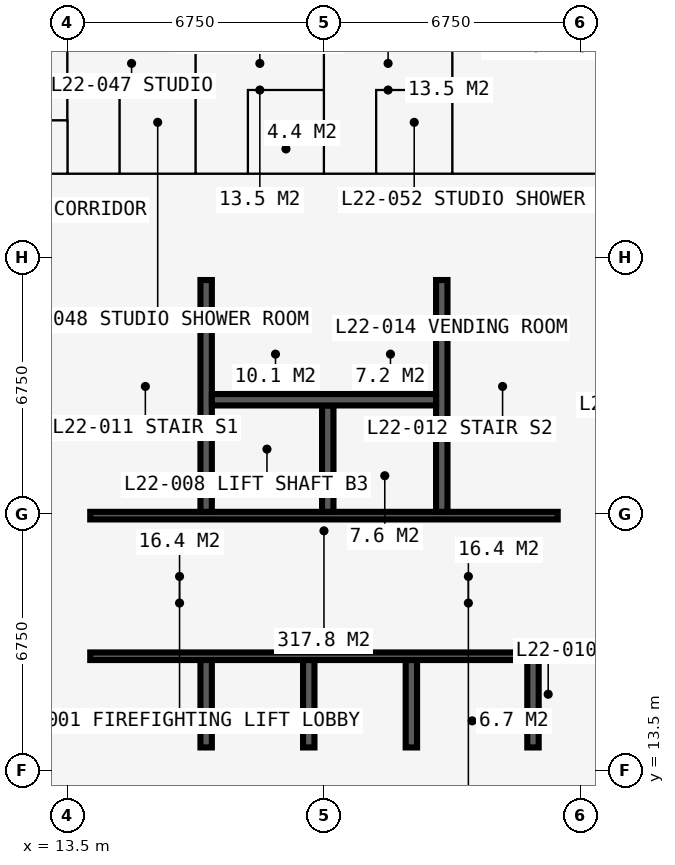
"""IFC4 building model, lengths in metres.
Left out: names, types, materials, properties, quantities, classifications, styles, units other than length and angle.
Written with IfcOpenShell. Run it as: python <this file> out.ifc"""

import sys

from ifc_helpers import new_model, si_unit, direction, frame, frame_2d, origin, place, context, subcontext, project, spatial, rectangle, extrude, element, fill, save


model = new_model("IFC4")
c1 = context("Model", 3, precision=1e-05, world=origin(), true_north=direction((0.0, 1.0)))
c2 = subcontext(c1, "Body", "Model", "MODEL_VIEW")
j1 = project(units=[si_unit("LENGTHUNIT", "METRE"), si_unit("PLANEANGLEUNIT", "RADIAN")], contexts=[c1])
p1 = place(None, origin())
s1 = spatial("IfcSite", under=j1, at=p1, CompositionType="ELEMENT")
p2 = place(p1, origin())
s2 = spatial("IfcBuilding", under=s1, at=p2, CompositionType="ELEMENT")
p3 = place(p2, frame((0.0, 0.0, 83.7)))
s3 = spatial("IfcBuildingStorey", under=s2, at=p3, CompositionType="ELEMENT", Elevation=83.7)
p4 = place(p3, frame((12.9, 13.5, 0.0), z_axis=(0.0, 0.0, 1.0), x_axis=(1.0, 0.0, 0.0)))
e1 = element("IfcWall", 1, at=p4, inside=s3, PredefinedType="SHEAR", context=c2, shape_type="SweptSolid", body=[
    extrude(rectangle(XDim=14.7, YDim=1.2, at=frame_2d((7.35, 0.0))), origin(), (0.0, 0.0, 1.0), 3.6),
])
p5 = place(p3, frame((27.0, 14.1, 0.0), z_axis=(0.0, 0.0, 1.0), x_axis=(0.0, 1.0, 0.0)))
e2 = element("IfcWall", 2, at=p5, inside=s3, PredefinedType="SHEAR", context=c2, shape_type="SweptSolid", body=[
    extrude(rectangle(XDim=12.3, YDim=1.2, at=frame_2d((6.15, 0.0))), origin(), (0.0, 0.0, 1.0), 3.6),
])
p6 = place(p5, frame((3.65, 0.0, 0.0)))
e3 = element("IfcOpeningElement", 3, at=p6, cuts=e2, PredefinedType="OPENING", context=c2, shape_type="SweptSolid", body=[
    extrude(rectangle(XDim=1.2, YDim=2.2, at=frame_2d((0.6, 1.1))), frame((0.0, 0.61, 0.0), z_axis=(0.0, -1.0, 0.0), x_axis=(1.0, 0.0, 0.0)), (0.0, 0.0, 1.0), 1.22),
])
p7 = place(p3, frame((27.6, 27.0, 0.0), z_axis=(0.0, 0.0, 1.0), x_axis=(-1.0, 0.0, 0.0)))
e4 = element("IfcWall", 4, at=p7, inside=s3, PredefinedType="SHEAR", context=c2, shape_type="SweptSolid", body=[
    extrude(rectangle(XDim=14.7, YDim=1.2, at=frame_2d((7.35, 0.0))), origin(), (0.0, 0.0, 1.0), 3.6),
])
p8 = place(p7, frame((4.55, 0.0, 0.0)))
e5 = element("IfcOpeningElement", 5, at=p8, cuts=e4, PredefinedType="OPENING", context=c2, shape_type="SweptSolid", body=[
    extrude(rectangle(XDim=0.9, YDim=2.2, at=frame_2d((0.45, 1.1))), frame((0.0, 0.61, 0.0), z_axis=(0.0, -1.0, 0.0), x_axis=(1.0, 0.0, 0.0)), (0.0, 0.0, 1.0), 1.22),
])
p9 = place(p7, frame((7.525, 0.0, 0.0)))
e6 = element("IfcOpeningElement", 6, at=p9, cuts=e4, PredefinedType="OPENING", context=c2, shape_type="SweptSolid", body=[
    extrude(rectangle(XDim=1.0, YDim=2.2, at=frame_2d((0.5, 1.1))), frame((0.0, 0.61, 0.0), z_axis=(0.0, -1.0, 0.0), x_axis=(1.0, 0.0, 0.0)), (0.0, 0.0, 1.0), 1.22),
])
p10 = place(p3, frame((13.5, 26.4, 0.0), z_axis=(0.0, 0.0, 1.0), x_axis=(0.0, -1.0, 0.0)))
e7 = element("IfcWall", 7, at=p10, inside=s3, PredefinedType="SHEAR", context=c2, shape_type="SweptSolid", body=[
    extrude(rectangle(XDim=12.3, YDim=1.2, at=frame_2d((6.15, 0.0))), origin(), (0.0, 0.0, 1.0), 3.6),
])
p11 = place(p10, frame((7.45, 0.0, 0.0)))
e8 = element("IfcOpeningElement", 8, at=p11, cuts=e7, PredefinedType="OPENING", context=c2, shape_type="SweptSolid", body=[
    extrude(rectangle(XDim=1.2, YDim=2.2, at=frame_2d((0.6, 1.1))), frame((0.0, 0.61, 0.0), z_axis=(0.0, -1.0, 0.0), x_axis=(1.0, 0.0, 0.0)), (0.0, 0.0, 1.0), 1.22),
])
p12 = place(p3, frame((14.1, 16.5, 0.0), z_axis=(0.0, 0.0, 1.0), x_axis=(1.0, 0.0, 0.0)))
e9 = element("IfcWall", 9, at=p12, inside=s3, PredefinedType="SHEAR", context=c2, shape_type="SweptSolid", body=[
    extrude(rectangle(XDim=12.3, YDim=0.2, at=frame_2d((6.15, 0.0))), origin(), (0.0, 0.0, 1.0), 3.6),
])
p13 = place(p12, frame((0.9, 0.0, 0.0)))
e10 = element("IfcOpeningElement", 10, at=p13, cuts=e9, PredefinedType="OPENING", context=c2, shape_type="SweptSolid", body=[
    extrude(rectangle(XDim=1.1, YDim=2.2, at=frame_2d((0.55, 1.1))), frame((0.0, 0.11, 0.0), z_axis=(0.0, -1.0, 0.0), x_axis=(1.0, 0.0, 0.0)), (0.0, 0.0, 1.0), 0.22),
])
p14 = place(p12, frame((9.5, 0.0, 0.0)))
e11 = element("IfcOpeningElement", 11, at=p14, cuts=e9, PredefinedType="OPENING", context=c2, shape_type="SweptSolid", body=[
    extrude(rectangle(XDim=1.1, YDim=2.2, at=frame_2d((0.55, 1.1))), frame((0.0, 0.11, 0.0), z_axis=(0.0, -1.0, 0.0), x_axis=(1.0, 0.0, 0.0)), (0.0, 0.0, 1.0), 0.22),
])
p15 = place(p3, frame((14.1, 20.2, 0.0), z_axis=(0.0, 0.0, 1.0), x_axis=(1.0, 0.0, 0.0)))
e12 = element("IfcWall", 12, at=p15, inside=s3, PredefinedType="SHEAR", context=c2, shape_type="SweptSolid", body=[
    extrude(rectangle(XDim=12.3, YDim=0.2, at=frame_2d((6.15, 0.0))), origin(), (0.0, 0.0, 1.0), 3.6),
])
p16 = place(p15, frame((0.35, 0.0, 0.0)))
e13 = element("IfcOpeningElement", 13, at=p16, cuts=e12, PredefinedType="OPENING", context=c2, shape_type="SweptSolid", body=[
    extrude(rectangle(XDim=1.1, YDim=2.2, at=frame_2d((0.55, 1.1))), frame((0.0, 0.11, 0.0), z_axis=(0.0, -1.0, 0.0), x_axis=(1.0, 0.0, 0.0)), (0.0, 0.0, 1.0), 0.22),
])
p17 = place(p15, frame((9.75, 0.0, 0.0)))
e14 = element("IfcOpeningElement", 14, at=p17, cuts=e12, PredefinedType="OPENING", context=c2, shape_type="SweptSolid", body=[
    extrude(rectangle(XDim=1.1, YDim=2.2, at=frame_2d((0.55, 1.1))), frame((0.0, 0.11, 0.0), z_axis=(0.0, -1.0, 0.0), x_axis=(1.0, 0.0, 0.0)), (0.0, 0.0, 1.0), 0.22),
])
for number, where, z_axis, x_axis in (
    (15, (17.15, 20.3, 0.0), (0.0, 0.0, 1.0), (0.0, 1.0, 0.0)),
    (16, (23.35, 20.3, 0.0), (0.0, 0.0, 1.0), (0.0, 1.0, 0.0)),
):
    element("IfcWall", number, at=place(p3, frame(where, z_axis=z_axis, x_axis=x_axis)), inside=s3, PredefinedType="SHEAR", context=c2, shape_type="SweptSolid", body=[
        extrude(rectangle(XDim=6.1, YDim=0.3, at=frame_2d((3.05, 0.0))), origin(), (0.0, 0.0, 1.0), 3.6),
    ])
p18 = place(p3, frame((20.35, 20.3, 0.0), z_axis=(0.0, 0.0, 1.0), x_axis=(0.0, 1.0, 0.0)))
e17 = element("IfcWall", 17, at=p18, inside=s3, PredefinedType="SHEAR", context=c2, shape_type="SweptSolid", body=[
    extrude(rectangle(XDim=2.8, YDim=0.3, at=frame_2d((1.4, 0.0))), origin(), (0.0, 0.0, 1.0), 3.6),
])
p19 = place(p3, frame((17.3, 23.25, 0.0), z_axis=(0.0, 0.0, 1.0), x_axis=(1.0, 0.0, 0.0)))
e18 = element("IfcWall", 18, at=p19, inside=s3, PredefinedType="SHEAR", context=c2, shape_type="SweptSolid", body=[
    extrude(rectangle(XDim=5.9, YDim=0.3, at=frame_2d((2.95, 0.0))), origin(), (0.0, 0.0, 1.0), 3.6),
])
for number, where, z_axis, x_axis in (
    (19, (17.15, 14.1, 0.0), (0.0, 0.0, 1.0), (0.0, 1.0, 0.0)),
    (20, (19.85, 14.1, 0.0), (0.0, 0.0, 1.0), (0.0, 1.0, 0.0)),
    (21, (22.55, 14.1, 0.0), (0.0, 0.0, 1.0), (0.0, 1.0, 0.0)),
    (22, (25.75, 14.1, 0.0), (0.0, 0.0, 1.0), (0.0, 1.0, 0.0)),
):
    element("IfcWall", number, at=place(p3, frame(where, z_axis=z_axis, x_axis=x_axis)), inside=s3, PredefinedType="SHEAR", context=c2, shape_type="SweptSolid", body=[
        extrude(rectangle(XDim=2.3, YDim=0.3, at=frame_2d((1.15, 0.0))), origin(), (0.0, 0.0, 1.0), 3.6),
    ])
p20 = place(p3, frame((18.875, 16.6, 0.0), z_axis=(0.0, 0.0, 1.0), x_axis=(0.0, 1.0, 0.0)))
e23 = element("IfcWall", 23, at=p20, inside=s3, PredefinedType="PARTITIONING", context=c2, shape_type="SweptSolid", body=[
    extrude(rectangle(XDim=3.5, YDim=0.15, at=frame_2d((1.75, 0.0))), origin(), (0.0, 0.0, 1.0), 3.375),
])
p21 = place(p20, frame((1.15, 0.0, 0.0)))
e24 = element("IfcOpeningElement", 24, at=p21, cuts=e23, PredefinedType="OPENING", context=c2, shape_type="SweptSolid", body=[
    extrude(rectangle(XDim=1.2, YDim=2.2, at=frame_2d((0.6, 1.1))), frame((0.0, 0.085, 0.0), z_axis=(0.0, -1.0, 0.0), x_axis=(1.0, 0.0, 0.0)), (0.0, 0.0, 1.0), 0.17),
])
p22 = place(p3, frame((21.625, 16.6, 0.0), z_axis=(0.0, 0.0, 1.0), x_axis=(0.0, 1.0, 0.0)))
e25 = element("IfcWall", 25, at=p22, inside=s3, PredefinedType="PARTITIONING", context=c2, shape_type="SweptSolid", body=[
    extrude(rectangle(XDim=3.5, YDim=0.15, at=frame_2d((1.75, 0.0))), origin(), (0.0, 0.0, 1.0), 3.375),
])
p23 = place(p22, frame((1.15, 0.0, 0.0)))
e26 = element("IfcOpeningElement", 26, at=p23, cuts=e25, PredefinedType="OPENING", context=c2, shape_type="SweptSolid", body=[
    extrude(rectangle(XDim=1.2, YDim=2.2, at=frame_2d((0.6, 1.1))), frame((0.0, 0.085, 0.0), z_axis=(0.0, -1.0, 0.0), x_axis=(1.0, 0.0, 0.0)), (0.0, 0.0, 1.0), 0.17),
])
p24 = place(p3, frame((20.725, 23.4, 0.0), z_axis=(0.0, 0.0, 1.0), x_axis=(0.0, 1.0, 0.0)))
e27 = element("IfcWall", 27, at=p24, inside=s3, PredefinedType="PARTITIONING", context=c2, shape_type="SweptSolid", body=[
    extrude(rectangle(XDim=3.0, YDim=0.15, at=frame_2d((1.5, 0.0))), origin(), (0.0, 0.0, 1.0), 3.375),
])
p25 = place(p3, frame((10.125, 30.6, 0.0), z_axis=(0.0, 0.0, 1.0), x_axis=(1.0, 0.0, 0.0)))
e28 = element("IfcWall", 28, at=p25, inside=s3, PredefinedType="PARTITIONING", context=c2, shape_type="SweptSolid", body=[
    extrude(rectangle(XDim=3.375, YDim=0.1, at=frame_2d((1.688, 0.0))), origin(), (0.0, 0.0, 1.0), 3.375),
])
p26 = place(p25, frame((2.2, 0.0, 0.0)))
e29 = element("IfcOpeningElement", 29, at=p26, cuts=e28, PredefinedType="OPENING", context=c2, shape_type="SweptSolid", body=[
    extrude(rectangle(XDim=0.95, YDim=2.2, at=frame_2d((0.475, 1.1))), frame((0.0, 0.06, 0.0), z_axis=(0.0, -1.0, 0.0), x_axis=(1.0, 0.0, 0.0)), (0.0, 0.0, 1.0), 0.12),
])
p27 = place(p3, frame((11.3, 29.2, 0.0), z_axis=(0.0, 0.0, 1.0), x_axis=(1.0, 0.0, 0.0)))
e30 = element("IfcWall", 30, at=p27, inside=s3, PredefinedType="PARTITIONING", context=c2, shape_type="SweptSolid", body=[
    extrude(rectangle(XDim=19.075, YDim=0.15, at=frame_2d((9.538, 0.0))), origin(), (0.0, 0.0, 1.0), 3.375),
])
p28 = place(p27, frame((5.825, 0.0, 0.0)))
e31 = element("IfcOpeningElement", 31, at=p28, cuts=e30, PredefinedType="OPENING", context=c2, shape_type="SweptSolid", body=[
    extrude(rectangle(XDim=0.95, YDim=2.2, at=frame_2d((0.475, 1.1))), frame((0.0, 0.085, 0.0), z_axis=(0.0, -1.0, 0.0), x_axis=(1.0, 0.0, 0.0)), (0.0, 0.0, 1.0), 0.17),
])
p29 = place(p27, frame((9.2, 0.0, 0.0)))
e32 = element("IfcOpeningElement", 32, at=p29, cuts=e30, PredefinedType="OPENING", context=c2, shape_type="SweptSolid", body=[
    extrude(rectangle(XDim=0.95, YDim=2.2, at=frame_2d((0.475, 1.1))), frame((0.0, 0.085, 0.0), z_axis=(0.0, -1.0, 0.0), x_axis=(1.0, 0.0, 0.0)), (0.0, 0.0, 1.0), 0.17),
])
p30 = place(p27, frame((0.6, 0.0, 0.0)))
e33 = element("IfcOpeningElement", 33, at=p30, cuts=e30, PredefinedType="OPENING", context=c2, shape_type="SweptSolid", body=[
    extrude(rectangle(XDim=1.0, YDim=2.2, at=frame_2d((0.5, 1.1))), frame((0.0, 0.085, 0.0), z_axis=(0.0, -1.0, 0.0), x_axis=(1.0, 0.0, 0.0)), (0.0, 0.0, 1.0), 0.17),
])
p31 = place(p3, frame((13.5, 29.2, 0.0), z_axis=(0.0, 0.0, 1.0), x_axis=(0.0, 1.0, 0.0)))
e34 = element("IfcWall", 34, at=p31, inside=s3, PredefinedType="PARTITIONING", context=c2, shape_type="SweptSolid", body=[
    extrude(rectangle(XDim=5.284, YDim=0.175, at=frame_2d((2.642, 0.0))), origin(), (0.0, 0.0, 1.0), 2.61),
])
p32 = place(p31, frame((0.25, 0.0, 0.0)))
e35 = element("IfcOpeningElement", 35, at=p32, cuts=e34, PredefinedType="OPENING", context=c2, shape_type="SweptSolid", body=[
    extrude(rectangle(XDim=0.95, YDim=2.2, at=frame_2d((0.475, 1.1))), frame((0.0, 0.097, 0.0), z_axis=(0.0, -1.0, 0.0), x_axis=(1.0, 0.0, 0.0)), (0.0, 0.0, 1.0), 0.195),
])
p33 = place(p3, frame((14.875, 29.2, 0.0), z_axis=(0.0, 0.0, 1.0), x_axis=(0.0, 1.0, 0.0)))
e36 = element("IfcWall", 36, at=p33, inside=s3, PredefinedType="PARTITIONING", context=c2, shape_type="SweptSolid", body=[
    extrude(rectangle(XDim=2.2, YDim=0.1, at=frame_2d((1.1, 0.0))), origin(), (0.0, 0.0, 1.0), 3.375),
])
p34 = place(p33, frame((0.65, 0.0, 0.0)))
e37 = element("IfcOpeningElement", 37, at=p34, cuts=e36, PredefinedType="OPENING", context=c2, shape_type="SweptSolid", body=[
    extrude(rectangle(XDim=0.9, YDim=2.2, at=frame_2d((0.45, 1.1))), frame((0.0, 0.06, 0.0), z_axis=(0.0, -1.0, 0.0), x_axis=(1.0, 0.0, 0.0)), (0.0, 0.0, 1.0), 0.12),
])
p35 = place(p3, frame((14.875, 31.4, 0.0), z_axis=(0.0, 0.0, 1.0), x_axis=(1.0, 0.0, 0.0)))
e38 = element("IfcWall", 38, at=p35, inside=s3, PredefinedType="PARTITIONING", context=c2, shape_type="SweptSolid", body=[
    extrude(rectangle(XDim=2.0, YDim=0.1, at=frame_2d((1.0, 0.0))), origin(), (0.0, 0.0, 1.0), 3.375),
])
p36 = place(p3, frame((16.875, 29.2, 0.0), z_axis=(0.0, 0.0, 1.0), x_axis=(0.0, 1.0, 0.0)))
e39 = element("IfcWall", 39, at=p36, inside=s3, PredefinedType="PARTITIONING", context=c2, shape_type="SweptSolid", body=[
    extrude(rectangle(XDim=5.284, YDim=0.175, at=frame_2d((2.642, 0.0))), origin(), (0.0, 0.0, 1.0), 3.375),
])
p37 = place(p3, frame((18.25, 29.2, 0.0), z_axis=(0.0, 0.0, 1.0), x_axis=(0.0, 1.0, 0.0)))
e40 = element("IfcWall", 40, at=p37, inside=s3, PredefinedType="PARTITIONING", context=c2, shape_type="SweptSolid", body=[
    extrude(rectangle(XDim=2.2, YDim=0.1, at=frame_2d((1.1, 0.0))), origin(), (0.0, 0.0, 1.0), 3.375),
])
p38 = place(p37, frame((0.65, 0.0, 0.0)))
e41 = element("IfcOpeningElement", 41, at=p38, cuts=e40, PredefinedType="OPENING", context=c2, shape_type="SweptSolid", body=[
    extrude(rectangle(XDim=0.9, YDim=2.2, at=frame_2d((0.45, 1.1))), frame((0.0, 0.06, 0.0), z_axis=(0.0, -1.0, 0.0), x_axis=(1.0, 0.0, 0.0)), (0.0, 0.0, 1.0), 0.12),
])
p39 = place(p3, frame((18.25, 31.4, 0.0), z_axis=(0.0, 0.0, 1.0), x_axis=(1.0, 0.0, 0.0)))
e42 = element("IfcWall", 42, at=p39, inside=s3, PredefinedType="PARTITIONING", context=c2, shape_type="SweptSolid", body=[
    extrude(rectangle(XDim=2.0, YDim=0.1, at=frame_2d((1.0, 0.0))), origin(), (0.0, 0.0, 1.0), 3.375),
])
p40 = place(p3, frame((20.25, 29.2, 0.0), z_axis=(0.0, 0.0, 1.0), x_axis=(0.0, 1.0, 0.0)))
e43 = element("IfcWall", 43, at=p40, inside=s3, PredefinedType="PARTITIONING", context=c2, shape_type="SweptSolid", body=[
    extrude(rectangle(XDim=5.284, YDim=0.175, at=frame_2d((2.642, 0.0))), origin(), (0.0, 0.0, 1.0), 2.61),
])
p41 = place(p3, frame((21.625, 29.2, 0.0), z_axis=(0.0, 0.0, 1.0), x_axis=(0.0, 1.0, 0.0)))
e44 = element("IfcWall", 44, at=p41, inside=s3, PredefinedType="PARTITIONING", context=c2, shape_type="SweptSolid", body=[
    extrude(rectangle(XDim=2.2, YDim=0.1, at=frame_2d((1.1, 0.0))), origin(), (0.0, 0.0, 1.0), 3.375),
])
p42 = place(p41, frame((0.65, 0.0, 0.0)))
e45 = element("IfcOpeningElement", 45, at=p42, cuts=e44, PredefinedType="OPENING", context=c2, shape_type="SweptSolid", body=[
    extrude(rectangle(XDim=0.9, YDim=2.2, at=frame_2d((0.45, 1.1))), frame((0.0, 0.06, 0.0), z_axis=(0.0, -1.0, 0.0), x_axis=(1.0, 0.0, 0.0)), (0.0, 0.0, 1.0), 0.12),
])
p43 = place(p3, frame((21.625, 31.4, 0.0), z_axis=(0.0, 0.0, 1.0), x_axis=(1.0, 0.0, 0.0)))
e46 = element("IfcWall", 46, at=p43, inside=s3, PredefinedType="PARTITIONING", context=c2, shape_type="SweptSolid", body=[
    extrude(rectangle(XDim=2.0, YDim=0.1, at=frame_2d((1.0, 0.0))), origin(), (0.0, 0.0, 1.0), 3.375),
])
p44 = place(p3, frame((23.625, 29.2, 0.0), z_axis=(0.0, 0.0, 1.0), x_axis=(0.0, 1.0, 0.0)))
e47 = element("IfcWall", 47, at=p44, inside=s3, PredefinedType="PARTITIONING", context=c2, shape_type="SweptSolid", body=[
    extrude(rectangle(XDim=5.284, YDim=0.15, at=frame_2d((2.642, 0.0))), origin(), (0.0, 0.0, 1.0), 3.375),
])
p45 = place(p13, origin())
e48 = element("IfcDoor", 48, at=p45, inside=s3, OperationType="DOUBLE_DOOR_SLIDING", PredefinedType="DOOR", context=c2, shape_type="SweptSolid", body=[
    extrude(rectangle(XDim=1.1, YDim=2.2, at=frame_2d((0.55, 1.1))), frame((0.0, 0.025, 0.0), z_axis=(0.0, -1.0, 0.0), x_axis=(1.0, 0.0, 0.0)), (0.0, 0.0, 1.0), 0.05),
])
fill(e10, e48)
p46 = place(p14, origin())
e49 = element("IfcDoor", 49, at=p46, inside=s3, OperationType="DOUBLE_DOOR_SLIDING", PredefinedType="DOOR", context=c2, shape_type="SweptSolid", body=[
    extrude(rectangle(XDim=1.1, YDim=2.2, at=frame_2d((0.55, 1.1))), frame((0.0, 0.025, 0.0), z_axis=(0.0, -1.0, 0.0), x_axis=(1.0, 0.0, 0.0)), (0.0, 0.0, 1.0), 0.05),
])
fill(e11, e49)
p47 = place(p11, origin())
e50 = element("IfcDoor", 50, at=p47, inside=s3, OperationType="DOUBLE_DOOR_SINGLE_SWING", PredefinedType="DOOR", context=c2, shape_type="SweptSolid", body=[
    extrude(rectangle(XDim=1.2, YDim=2.2, at=frame_2d((0.6, 1.1))), frame((0.0, 0.025, 0.0), z_axis=(0.0, -1.0, 0.0), x_axis=(1.0, 0.0, 0.0)), (0.0, 0.0, 1.0), 0.05),
])
fill(e8, e50)
p48 = place(p6, origin())
e51 = element("IfcDoor", 51, at=p48, inside=s3, OperationType="DOUBLE_DOOR_SINGLE_SWING", PredefinedType="DOOR", context=c2, shape_type="SweptSolid", body=[
    extrude(rectangle(XDim=1.2, YDim=2.2, at=frame_2d((0.6, 1.1))), frame((0.0, 0.025, 0.0), z_axis=(0.0, -1.0, 0.0), x_axis=(1.0, 0.0, 0.0)), (0.0, 0.0, 1.0), 0.05),
])
fill(e3, e51)
p49 = place(p21, origin())
e52 = element("IfcDoor", 52, at=p49, inside=s3, OperationType="DOUBLE_DOOR_SINGLE_SWING", PredefinedType="DOOR", context=c2, shape_type="SweptSolid", body=[
    extrude(rectangle(XDim=1.2, YDim=2.2, at=frame_2d((0.6, 1.1))), frame((0.0, 0.025, 0.0), z_axis=(0.0, -1.0, 0.0), x_axis=(1.0, 0.0, 0.0)), (0.0, 0.0, 1.0), 0.05),
])
fill(e24, e52)
p50 = place(p23, origin())
e53 = element("IfcDoor", 53, at=p50, inside=s3, OperationType="DOUBLE_DOOR_SINGLE_SWING", PredefinedType="DOOR", context=c2, shape_type="SweptSolid", body=[
    extrude(rectangle(XDim=1.2, YDim=2.2, at=frame_2d((0.6, 1.1))), frame((0.0, 0.025, 0.0), z_axis=(0.0, -1.0, 0.0), x_axis=(1.0, 0.0, 0.0)), (0.0, 0.0, 1.0), 0.05),
])
fill(e26, e53)
p51 = place(p8, origin())
e54 = element("IfcDoor", 54, at=p51, inside=s3, OperationType="SINGLE_SWING_LEFT", PredefinedType="DOOR", context=c2, shape_type="SweptSolid", body=[
    extrude(rectangle(XDim=0.9, YDim=2.2, at=frame_2d((0.45, 1.1))), frame((0.0, 0.4, 0.0), z_axis=(0.0, -1.0, 0.0), x_axis=(1.0, 0.0, 0.0)), (0.0, 0.0, 1.0), 0.8),
])
fill(e5, e54)
p52 = place(p9, origin())
e55 = element("IfcDoor", 55, at=p52, inside=s3, OperationType="SINGLE_SWING_LEFT", PredefinedType="DOOR", context=c2, shape_type="SweptSolid", body=[
    extrude(rectangle(XDim=1.0, YDim=2.2, at=frame_2d((0.5, 1.1))), frame((0.0, 0.025, 0.0), z_axis=(0.0, -1.0, 0.0), x_axis=(1.0, 0.0, 0.0)), (0.0, 0.0, 1.0), 0.05),
])
fill(e6, e55)
p53 = place(p16, origin())
e56 = element("IfcDoor", 56, at=p53, inside=s3, OperationType="SINGLE_SWING_LEFT", PredefinedType="DOOR", context=c2, shape_type="SweptSolid", body=[
    extrude(rectangle(XDim=1.1, YDim=2.2, at=frame_2d((0.55, 1.1))), frame((0.0, 0.025, 0.0), z_axis=(0.0, -1.0, 0.0), x_axis=(1.0, 0.0, 0.0)), (0.0, 0.0, 1.0), 0.05),
])
fill(e13, e56)
p54 = place(p17, origin())
e57 = element("IfcDoor", 57, at=p54, inside=s3, OperationType="SINGLE_SWING_LEFT", PredefinedType="DOOR", context=c2, shape_type="SweptSolid", body=[
    extrude(rectangle(XDim=1.1, YDim=2.2, at=frame_2d((0.55, 1.1))), frame((0.0, 0.025, 0.0), z_axis=(0.0, -1.0, 0.0), x_axis=(1.0, 0.0, 0.0)), (0.0, 0.0, 1.0), 0.05),
])
fill(e14, e57)
p55 = place(p26, origin())
e58 = element("IfcDoor", 58, at=p55, inside=s3, OperationType="SINGLE_SWING_LEFT", PredefinedType="DOOR", context=c2, shape_type="SweptSolid", body=[
    extrude(rectangle(XDim=0.95, YDim=2.2, at=frame_2d((0.475, 1.1))), frame((0.0, 0.025, 0.0), z_axis=(0.0, -1.0, 0.0), x_axis=(1.0, 0.0, 0.0)), (0.0, 0.0, 1.0), 0.05),
])
fill(e29, e58)
p56 = place(p32, origin())
e59 = element("IfcDoor", 59, at=p56, inside=s3, OperationType="SINGLE_SWING_LEFT", PredefinedType="DOOR", context=c2, shape_type="SweptSolid", body=[
    extrude(rectangle(XDim=0.95, YDim=2.2, at=frame_2d((0.475, 1.1))), frame((0.0, 0.025, 0.0), z_axis=(0.0, -1.0, 0.0), x_axis=(1.0, 0.0, 0.0)), (0.0, 0.0, 1.0), 0.05),
])
fill(e35, e59)
p57 = place(p34, origin())
e60 = element("IfcDoor", 60, at=p57, inside=s3, OperationType="SINGLE_SWING_RIGHT", PredefinedType="DOOR", context=c2, shape_type="SweptSolid", body=[
    extrude(rectangle(XDim=0.9, YDim=2.2, at=frame_2d((0.45, 1.1))), frame((0.0, 0.025, 0.0), z_axis=(0.0, -1.0, 0.0), x_axis=(1.0, 0.0, 0.0)), (0.0, 0.0, 1.0), 0.05),
])
fill(e37, e60)
p58 = place(p28, origin())
e61 = element("IfcDoor", 61, at=p58, inside=s3, OperationType="SINGLE_SWING_LEFT", PredefinedType="DOOR", context=c2, shape_type="SweptSolid", body=[
    extrude(rectangle(XDim=0.95, YDim=2.2, at=frame_2d((0.475, 1.1))), frame((0.0, 0.025, 0.0), z_axis=(0.0, -1.0, 0.0), x_axis=(1.0, 0.0, 0.0)), (0.0, 0.0, 1.0), 0.05),
])
fill(e31, e61)
p59 = place(p38, origin())
e62 = element("IfcDoor", 62, at=p59, inside=s3, OperationType="SINGLE_SWING_RIGHT", PredefinedType="DOOR", context=c2, shape_type="SweptSolid", body=[
    extrude(rectangle(XDim=0.9, YDim=2.2, at=frame_2d((0.45, 1.1))), frame((0.0, 0.025, 0.0), z_axis=(0.0, -1.0, 0.0), x_axis=(1.0, 0.0, 0.0)), (0.0, 0.0, 1.0), 0.05),
])
fill(e41, e62)
p60 = place(p29, origin())
e63 = element("IfcDoor", 63, at=p60, inside=s3, OperationType="SINGLE_SWING_LEFT", PredefinedType="DOOR", context=c2, shape_type="SweptSolid", body=[
    extrude(rectangle(XDim=0.95, YDim=2.2, at=frame_2d((0.475, 1.1))), frame((0.0, 0.025, 0.0), z_axis=(0.0, -1.0, 0.0), x_axis=(1.0, 0.0, 0.0)), (0.0, 0.0, 1.0), 0.05),
])
fill(e32, e63)
p61 = place(p42, origin())
e64 = element("IfcDoor", 64, at=p61, inside=s3, OperationType="SINGLE_SWING_RIGHT", PredefinedType="DOOR", context=c2, shape_type="SweptSolid", body=[
    extrude(rectangle(XDim=0.9, YDim=2.2, at=frame_2d((0.45, 1.1))), frame((0.0, 0.025, 0.0), z_axis=(0.0, -1.0, 0.0), x_axis=(1.0, 0.0, 0.0)), (0.0, 0.0, 1.0), 0.05),
])
fill(e45, e64)
save(model, sys.argv[1])
